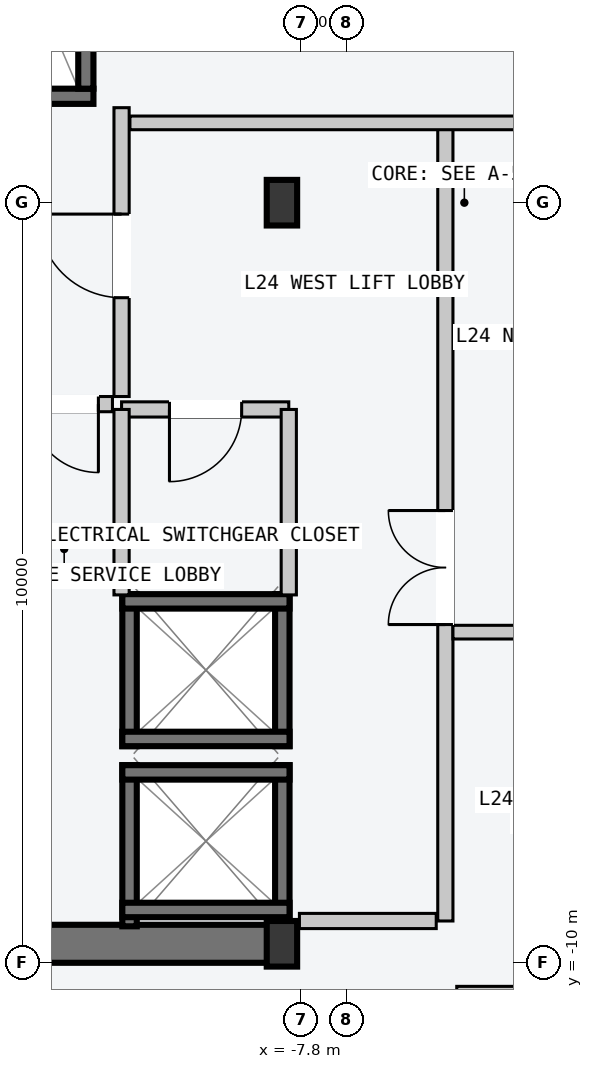
"""IFC4 building model, lengths in metres.
Left out: names, types, materials, properties, quantities, classifications, styles, units other than length and angle.
Written with IfcOpenShell. Run it as: python <this file> out.ifc"""

import sys

from ifc_helpers import new_model, si_unit, direction, frame, frame_2d, origin, origin_2d, place, context, subcontext, project, spatial, rectangle, i_section, extrude, element, fill, save


model = new_model("IFC4")
c1 = context("Model", 3, precision=1e-05, world=origin(), true_north=direction((0.0, 1.0)))
c2 = subcontext(c1, "Body", "Model", "MODEL_VIEW")
j1 = project(units=[si_unit("LENGTHUNIT", "METRE"), si_unit("PLANEANGLEUNIT", "RADIAN")], contexts=[c1])
p1 = place(None, origin())
s1 = spatial("IfcSite", under=j1, at=p1, CompositionType="ELEMENT")
p2 = place(p1, origin())
s2 = spatial("IfcBuilding", under=s1, at=p2, CompositionType="ELEMENT")
p3 = place(p2, frame((0.0, 0.0, 95.4)))
s3 = spatial("IfcBuildingStorey", under=s2, at=p3, CompositionType="ELEMENT", Elevation=95.4)
p4 = place(p3, frame((-14.53, -9.75, -0.2), z_axis=(0.0, 0.0, 1.0), x_axis=(1.0, 0.0, 0.0)))
e1 = element("IfcWall", 1, at=p4, inside=s3, PredefinedType="SHEAR", context=c2, shape_type="SweptSolid", body=[
    extrude(rectangle(XDim=6.46, YDim=0.5, at=frame_2d((3.23, 0.0))), origin(), (0.0, 0.0, 1.0), 3.6),
])
p5 = place(p3, frame((-14.25, 1.4, -0.2), z_axis=(0.0, 0.0, 1.0), x_axis=(1.0, 0.0, 0.0)))
e2 = element("IfcWall", 2, at=p5, inside=s3, PredefinedType="SOLIDWALL", context=c2, shape_type="SweptSolid", body=[
    extrude(rectangle(XDim=3.72, YDim=0.2, at=frame_2d((1.86, 0.0))), origin(), (0.0, 0.0, 1.0), 3.6),
])
p6 = place(p5, frame((1.5, 0.0, 0.2)))
e3 = element("IfcOpeningElement", 3, at=p6, cuts=e2, PredefinedType="OPENING", context=c2, shape_type="SweptSolid", body=[
    extrude(rectangle(XDim=1.12, YDim=2.18, at=frame_2d((0.56, 1.09))), frame((0.0, 0.11, 0.0), z_axis=(0.0, -1.0, 0.0), x_axis=(1.0, 0.0, 0.0)), (0.0, 0.0, 1.0), 0.22),
])
p7 = place(p3, frame((-10.63, 1.5, -0.2), z_axis=(0.0, 0.0, 1.0), x_axis=(0.0, 1.0, 0.0)))
e4 = element("IfcWall", 4, at=p7, inside=s3, PredefinedType="SOLIDWALL", context=c2, shape_type="SweptSolid", body=[
    extrude(rectangle(XDim=7.8, YDim=0.2, at=frame_2d((3.9, 0.0))), origin(), (0.0, 0.0, 1.0), 3.6),
])
for number, where, z_axis, x_axis in (
    (5, (-8.05, -9.75, 0.0), (0.0, 0.0, 1.0), (1.0, 0.0, 0.0)),
    (6, (-8.05, 0.0, 0.0), (0.0, 0.0, 1.0), (1.0, 0.0, 0.0)),
):
    element("IfcColumn", number, at=place(p3, frame(where, z_axis=z_axis, x_axis=x_axis)), inside=s3, PredefinedType="COLUMN", context=c2, shape_type="SweptSolid", body=[
        extrude(i_section(OverallWidth=0.4, OverallDepth=0.6, WebThickness=0.022, FlangeThickness=0.036, at=origin_2d()), origin(), (0.0, 0.0, 1.0), 3.6),
    ])
for number, where, z_axis, x_axis in (
    (7, (-8.045, -9.52, -0.2), (0.0, 0.0, 1.0), (0.0, 1.0, 0.0)),
    (8, (-10.055, -9.52, -0.2), (0.0, 0.0, 1.0), (0.0, 1.0, 0.0)),
):
    element("IfcWall", number, at=place(p3, frame(where, z_axis=z_axis, x_axis=x_axis)), inside=s3, PredefinedType="SOLIDWALL", context=c2, shape_type="SweptSolid", body=[
        extrude(rectangle(XDim=2.12, YDim=0.19, at=frame_2d((1.06, 0.0))), origin(), (0.0, 0.0, 1.0), 3.6),
    ])
for number, where, z_axis, x_axis in (
    (9, (-10.15, -7.495, -0.2), (0.0, 0.0, 1.0), (1.0, 0.0, 0.0)),
    (10, (-10.15, -9.305, -0.2), (0.0, 0.0, 1.0), (1.0, 0.0, 0.0)),
):
    element("IfcWall", number, at=place(p3, frame(where, z_axis=z_axis, x_axis=x_axis)), inside=s3, PredefinedType="SOLIDWALL", context=c2, shape_type="SweptSolid", body=[
        extrude(rectangle(XDim=2.2, YDim=0.19, at=frame_2d((1.1, 0.0))), origin(), (0.0, 0.0, 1.0), 3.6),
    ])
for number, where, z_axis, x_axis in (
    (11, (-8.045, -7.15, -0.2), (0.0, 0.0, 1.0), (0.0, 1.0, 0.0)),
    (12, (-10.055, -7.15, -0.2), (0.0, 0.0, 1.0), (0.0, 1.0, 0.0)),
):
    element("IfcWall", number, at=place(p3, frame(where, z_axis=z_axis, x_axis=x_axis)), inside=s3, PredefinedType="SOLIDWALL", context=c2, shape_type="SweptSolid", body=[
        extrude(rectangle(XDim=2.0, YDim=0.19, at=frame_2d((1.0, 0.0))), origin(), (0.0, 0.0, 1.0), 3.6),
    ])
for number, where, z_axis, x_axis in (
    (13, (-10.15, -5.245, -0.2), (0.0, 0.0, 1.0), (1.0, 0.0, 0.0)),
    (14, (-10.15, -7.055, -0.2), (0.0, 0.0, 1.0), (1.0, 0.0, 0.0)),
):
    element("IfcWall", number, at=place(p3, frame(where, z_axis=z_axis, x_axis=x_axis)), inside=s3, PredefinedType="SOLIDWALL", context=c2, shape_type="SweptSolid", body=[
        extrude(rectangle(XDim=2.2, YDim=0.19, at=frame_2d((1.1, 0.0))), origin(), (0.0, 0.0, 1.0), 3.6),
    ])
p8 = place(p3, frame((-5.9, -9.45, 0.0), z_axis=(0.0, 0.0, 1.0), x_axis=(0.0, 1.0, 0.0)))
e15 = element("IfcWall", 15, at=p8, inside=s3, PredefinedType="PARTITIONING", context=c2, shape_type="SweptSolid", body=[
    extrude(rectangle(XDim=10.5, YDim=0.2, at=frame_2d((5.25, 0.0))), origin(), (0.0, 0.0, 1.0), 3.4),
])
p9 = place(p8, frame((3.9, 0.0, 0.0)))
e16 = element("IfcOpeningElement", 16, at=p9, cuts=e15, PredefinedType="OPENING", context=c2, shape_type="SweptSolid", body=[
    extrude(rectangle(XDim=1.5, YDim=2.2, at=frame_2d((0.75, 1.1))), frame((0.0, 0.11, 0.0), z_axis=(0.0, -1.0, 0.0), x_axis=(1.0, 0.0, 0.0)), (0.0, 0.0, 1.0), 0.22),
])
p10 = place(p3, frame((-6.02, -9.45, 0.0), z_axis=(0.0, 0.0, 1.0), x_axis=(-1.0, 0.0, 0.0)))
e17 = element("IfcWall", 17, at=p10, inside=s3, PredefinedType="PARTITIONING", context=c2, shape_type="SweptSolid", body=[
    extrude(rectangle(XDim=1.8, YDim=0.2, at=frame_2d((0.9, 0.0))), origin(), (0.0, 0.0, 1.0), 3.4),
])
p11 = place(p3, frame((-10.16, -2.55, 0.0), z_axis=(0.0, 0.0, 1.0), x_axis=(0.0, 1.0, 0.0)))
e18 = element("IfcWall", 18, at=p11, inside=s3, PredefinedType="PARTITIONING", context=c2, shape_type="SweptSolid", body=[
    extrude(rectangle(XDim=3.8, YDim=0.2, at=frame_2d((1.9, 0.0))), origin(), (0.0, 0.0, 1.0), 3.4),
])
p12 = place(p11, frame((1.3, 0.0, 0.0)))
e19 = element("IfcOpeningElement", 19, at=p12, cuts=e18, PredefinedType="OPENING", context=c2, shape_type="SweptSolid", body=[
    extrude(rectangle(XDim=1.1, YDim=2.15, at=frame_2d((0.55, 1.075))), frame((0.0, 0.11, 0.0), z_axis=(0.0, -1.0, 0.0), x_axis=(1.0, 0.0, 0.0)), (0.0, 0.0, 1.0), 0.22),
])
p13 = place(p3, frame((-10.28, -2.65, 0.0), z_axis=(0.0, 0.0, 1.0), x_axis=(-1.0, 0.0, 0.0)))
e20 = element("IfcWall", 20, at=p13, inside=s3, PredefinedType="PARTITIONING", context=c2, shape_type="SweptSolid", body=[
    extrude(rectangle(XDim=1.27, YDim=0.2, at=frame_2d((0.635, 0.0))), origin(), (0.0, 0.0, 1.0), 3.4),
])
p14 = place(p13, frame((0.185, 0.0, 0.0)))
e21 = element("IfcOpeningElement", 21, at=p14, cuts=e20, PredefinedType="OPENING", context=c2, shape_type="SweptSolid", body=[
    extrude(rectangle(XDim=0.9, YDim=2.15, at=frame_2d((0.45, 1.075))), frame((0.0, 0.11, 0.0), z_axis=(0.0, -1.0, 0.0), x_axis=(1.0, 0.0, 0.0)), (0.0, 0.0, 1.0), 0.22),
])
p15 = place(p3, frame((-7.96, -2.72, 0.0), z_axis=(0.0, 0.0, 1.0), x_axis=(-1.0, 0.0, 0.0)))
e22 = element("IfcWall", 22, at=p15, inside=s3, PredefinedType="PARTITIONING", context=c2, shape_type="SweptSolid", body=[
    extrude(rectangle(XDim=2.2, YDim=0.2, at=frame_2d((1.1, 0.0))), origin(), (0.0, 0.0, 1.0), 3.4),
])
p16 = place(p15, frame((0.62, 0.0, 0.0)))
e23 = element("IfcOpeningElement", 23, at=p16, cuts=e22, PredefinedType="OPENING", context=c2, shape_type="SweptSolid", body=[
    extrude(rectangle(XDim=0.95, YDim=2.1, at=frame_2d((0.475, 1.05))), frame((0.0, 0.11, 0.0), z_axis=(0.0, -1.0, 0.0), x_axis=(1.0, 0.0, 0.0)), (0.0, 0.0, 1.0), 0.22),
])
for number, where, z_axis, x_axis in (
    (24, (-7.96, -5.16, 0.0), (0.0, 0.0, 1.0), (0.0, 1.0, 0.0)),
    (25, (-10.16, -5.16, 0.0), (0.0, 0.0, 1.0), (0.0, 1.0, 0.0)),
):
    element("IfcWall", number, at=place(p3, frame(where, z_axis=z_axis, x_axis=x_axis)), inside=s3, PredefinedType="PARTITIONING", context=c2, shape_type="SweptSolid", body=[
        extrude(rectangle(XDim=2.44, YDim=0.2, at=frame_2d((1.22, 0.0))), origin(), (0.0, 0.0, 1.0), 3.4),
    ])
p17 = place(p3, frame((-10.05, 1.05, 0.0), z_axis=(0.0, 0.0, 1.0), x_axis=(1.0, 0.0, 0.0)))
e26 = element("IfcWall", 26, at=p17, inside=s3, PredefinedType="PARTITIONING", context=c2, shape_type="SweptSolid", body=[
    extrude(rectangle(XDim=6.21, YDim=0.18, at=frame_2d((3.105, 0.0))), origin(), (0.0, 0.0, 1.0), 3.4),
])
p18 = place(p3, frame((-5.8, -5.65, 0.0), z_axis=(0.0, 0.0, 1.0), x_axis=(1.0, 0.0, 0.0)))
e27 = element("IfcWall", 27, at=p18, inside=s3, PredefinedType="PARTITIONING", context=c2, shape_type="SweptSolid", body=[
    extrude(rectangle(XDim=11.6, YDim=0.18, at=frame_2d((5.8, 0.0))), origin(), (0.0, 0.0, 1.0), 3.4),
])
p19 = place(p18, frame((5.1, 0.0, 0.0)))
e28 = element("IfcOpeningElement", 28, at=p19, cuts=e27, PredefinedType="OPENING", context=c2, shape_type="SweptSolid", body=[
    extrude(rectangle(XDim=1.4, YDim=2.2, at=frame_2d((0.7, 1.1))), frame((0.0, 0.1, 0.0), z_axis=(0.0, -1.0, 0.0), x_axis=(1.0, 0.0, 0.0)), (0.0, 0.0, 1.0), 0.2),
])
p20 = place(p3, frame((-5.75, -10.4, 0.0), z_axis=(0.0, 0.0, 1.0), x_axis=(1.0, 0.0, 0.0)))
e29 = element("IfcWall", 29, at=p20, inside=s3, PredefinedType="PARTITIONING", context=c2, shape_type="SweptSolid", body=[
    extrude(rectangle(XDim=11.5, YDim=0.18, at=frame_2d((5.75, 0.0))), origin(), (0.0, 0.0, 1.0), 3.4),
])
p21 = place(p20, frame((5.3, 0.0, 0.0)))
e30 = element("IfcOpeningElement", 30, at=p21, cuts=e29, PredefinedType="OPENING", context=c2, shape_type="SweptSolid", body=[
    extrude(rectangle(XDim=0.9, YDim=2.15, at=frame_2d((0.45, 1.075))), frame((0.0, 0.1, 0.0), z_axis=(0.0, -1.0, 0.0), x_axis=(1.0, 0.0, 0.0)), (0.0, 0.0, 1.0), 0.2),
])
p22 = place(p9, origin())
e31 = element("IfcDoor", 31, at=p22, inside=s3, OperationType="DOUBLE_DOOR_SINGLE_SWING", PredefinedType="DOOR", context=c2, shape_type="SweptSolid", body=[
    extrude(rectangle(XDim=1.5, YDim=2.2, at=frame_2d((0.75, 1.1))), frame((0.0, 0.025, 0.0), z_axis=(0.0, -1.0, 0.0), x_axis=(1.0, 0.0, 0.0)), (0.0, 0.0, 1.0), 0.05),
])
fill(e16, e31)
p23 = place(p12, origin())
e32 = element("IfcDoor", 32, at=p23, inside=s3, OperationType="SINGLE_SWING_RIGHT", PredefinedType="DOOR", context=c2, shape_type="SweptSolid", body=[
    extrude(rectangle(XDim=1.1, YDim=2.15, at=frame_2d((0.55, 1.075))), frame((0.0, 0.025, 0.0), z_axis=(0.0, -1.0, 0.0), x_axis=(1.0, 0.0, 0.0)), (0.0, 0.0, 1.0), 0.05),
])
fill(e19, e32)
p24 = place(p14, origin())
e33 = element("IfcDoor", 33, at=p24, inside=s3, OperationType="SINGLE_SWING_LEFT", PredefinedType="DOOR", context=c2, shape_type="SweptSolid", body=[
    extrude(rectangle(XDim=0.9, YDim=2.15, at=frame_2d((0.45, 1.075))), frame((0.0, 0.025, 0.0), z_axis=(0.0, -1.0, 0.0), x_axis=(1.0, 0.0, 0.0)), (0.0, 0.0, 1.0), 0.05),
])
fill(e21, e33)
p25 = place(p16, origin())
e34 = element("IfcDoor", 34, at=p25, inside=s3, OperationType="SINGLE_SWING_RIGHT", PredefinedType="DOOR", context=c2, shape_type="SweptSolid", body=[
    extrude(rectangle(XDim=0.95, YDim=2.1, at=frame_2d((0.475, 1.05))), frame((0.0, 0.025, 0.0), z_axis=(0.0, -1.0, 0.0), x_axis=(1.0, 0.0, 0.0)), (0.0, 0.0, 1.0), 0.05),
])
fill(e23, e34)
save(model, sys.argv[1])
